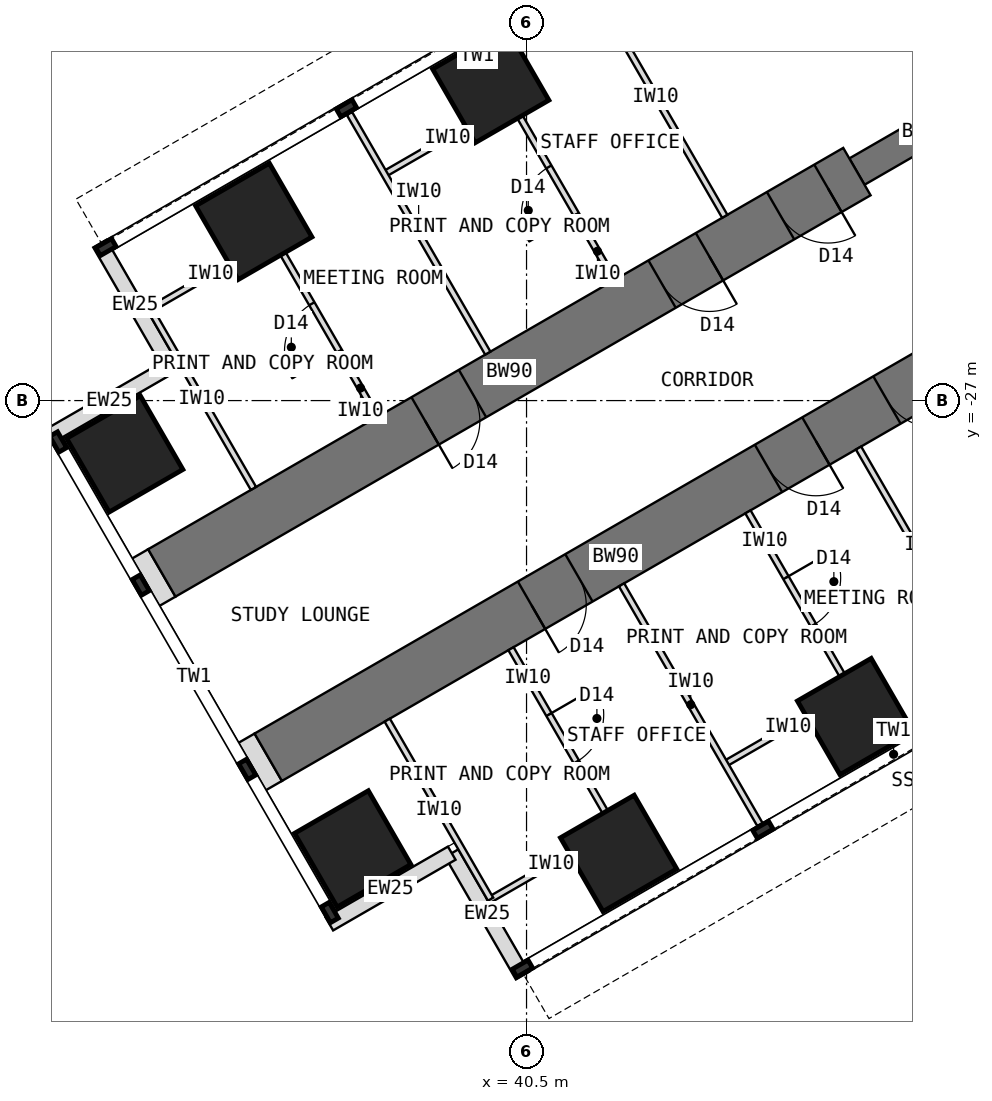
"""IFC4 building model, lengths in metres.
Left out: names, types, materials, properties, quantities, classifications, styles, units other than length and angle.
Written with IfcOpenShell. Run it as: python <this file> out.ifc"""

import sys

from ifc_helpers import new_model, si_unit, direction, frame, frame_2d, origin, origin_2d, place, context, subcontext, project, spatial, rectangle, extrude, element, fill, save


model = new_model("IFC4")
c1 = context("Model", 3, precision=1e-05, world=origin(), true_north=direction((0.0, 1.0)))
c2 = subcontext(c1, "Body", "Model", "MODEL_VIEW")
j1 = project(units=[si_unit("LENGTHUNIT", "METRE"), si_unit("PLANEANGLEUNIT", "RADIAN")], contexts=[c1])
p1 = place(None, origin())
s1 = spatial("IfcSite", under=j1, at=p1, CompositionType="ELEMENT")
p2 = place(p1, origin())
s2 = spatial("IfcBuilding", under=s1, at=p2, CompositionType="ELEMENT")
p3 = place(p2, frame((0.0, 0.0, 84.5)))
s3 = spatial("IfcBuildingStorey", under=s2, at=p3, CompositionType="ELEMENT", Elevation=84.5)
p4 = place(p3, frame((45.904, -18.0, 0.0), z_axis=(0.0, 0.0, 1.0), x_axis=(0.500024481964, -0.866011268655, 0.0)))
e1 = element("IfcWall", 1, at=p4, inside=s3, PredefinedType="SHEAR", context=c2, shape_type="SweptSolid", body=[
    extrude(rectangle(XDim=4.548, YDim=0.7, at=frame_2d((2.274, 0.0))), origin(), (0.0, 0.0, 1.0), 4.0),
])
p5 = place(p3, frame((47.684, -26.266, 0.0), z_axis=(0.0, 0.0, 1.0), x_axis=(-0.866027579429, -0.499996231654, 0.0)))
e2 = element("IfcWall", 2, at=p5, inside=s3, PredefinedType="SHEAR", context=c2, shape_type="SweptSolid", body=[
    extrude(rectangle(XDim=13.2, YDim=0.9, at=frame_2d((6.6, 0.0))), origin(), (0.0, 0.0, 1.0), 4.0),
])
p6 = place(p5, frame((0.55, 0.0, 0.0)))
e3 = element("IfcOpeningElement", 3, at=p6, cuts=e2, PredefinedType="OPENING", context=c2, shape_type="SweptSolid", body=[
    extrude(rectangle(XDim=0.9, YDim=2.1, at=frame_2d((0.45, 1.05))), frame((0.0, 0.46, 0.0), z_axis=(0.0, -1.0, 0.0), x_axis=(1.0, 0.0, 0.0)), (0.0, 0.0, 1.0), 0.92),
])
p7 = place(p5, frame((2.8, 0.0, 0.0)))
e4 = element("IfcOpeningElement", 4, at=p7, cuts=e2, PredefinedType="OPENING", context=c2, shape_type="SweptSolid", body=[
    extrude(rectangle(XDim=0.9, YDim=2.1, at=frame_2d((0.45, 1.05))), frame((0.0, 0.46, 0.0), z_axis=(0.0, -1.0, 0.0), x_axis=(1.0, 0.0, 0.0)), (0.0, 0.0, 1.0), 0.92),
])
p8 = place(p5, frame((7.3, 0.0, 0.0)))
e5 = element("IfcOpeningElement", 5, at=p8, cuts=e2, PredefinedType="OPENING", context=c2, shape_type="SweptSolid", body=[
    extrude(rectangle(XDim=0.9, YDim=2.1, at=frame_2d((0.45, 1.05))), frame((0.0, 0.46, 0.0), z_axis=(0.0, -1.0, 0.0), x_axis=(1.0, 0.0, 0.0)), (0.0, 0.0, 1.0), 0.92),
])
p9 = place(p3, frame((48.178, -21.939, 0.0), z_axis=(0.0, 0.0, 1.0), x_axis=(-0.866072649678, -0.499918158782, 0.0)))
e6 = element("IfcWall", 6, at=p9, inside=s3, PredefinedType="SHEAR", context=c2, shape_type="SweptSolid", body=[
    extrude(rectangle(XDim=2.592, YDim=0.5, at=frame_2d((1.296, 0.0))), origin(), (0.0, 0.0, 1.0), 4.0),
])
p10 = place(p3, frame((45.934, -23.234, 0.0), z_axis=(0.0, 0.0, 1.0), x_axis=(-0.866019570528, -0.500010103361, 0.0)))
e7 = element("IfcWall", 7, at=p10, inside=s3, PredefinedType="SHEAR", context=c2, shape_type="SweptSolid", body=[
    extrude(rectangle(XDim=13.2, YDim=0.9, at=frame_2d((6.6, 0.0))), origin(), (0.0, 0.0, 1.0), 4.0),
])
p11 = place(p10, frame((0.55, 0.0, 0.0)))
e8 = element("IfcOpeningElement", 8, at=p11, cuts=e7, PredefinedType="OPENING", context=c2, shape_type="SweptSolid", body=[
    extrude(rectangle(XDim=0.9, YDim=2.1, at=frame_2d((0.45, 1.05))), frame((0.0, 0.46, 0.0), z_axis=(0.0, -1.0, 0.0), x_axis=(1.0, 0.0, 0.0)), (0.0, 0.0, 1.0), 0.92),
])
p12 = place(p10, frame((2.8, 0.0, 0.0)))
e9 = element("IfcOpeningElement", 9, at=p12, cuts=e7, PredefinedType="OPENING", context=c2, shape_type="SweptSolid", body=[
    extrude(rectangle(XDim=0.9, YDim=2.1, at=frame_2d((0.45, 1.05))), frame((0.0, 0.46, 0.0), z_axis=(0.0, -1.0, 0.0), x_axis=(1.0, 0.0, 0.0)), (0.0, 0.0, 1.0), 0.92),
])
p13 = place(p10, frame((7.3, 0.0, 0.0)))
e10 = element("IfcOpeningElement", 10, at=p13, cuts=e7, PredefinedType="OPENING", context=c2, shape_type="SweptSolid", body=[
    extrude(rectangle(XDim=0.9, YDim=2.1, at=frame_2d((0.45, 1.05))), frame((0.0, 0.46, 0.0), z_axis=(0.0, -1.0, 0.0), x_axis=(1.0, 0.0, 0.0)), (0.0, 0.0, 1.0), 0.92),
])
for number, where, z_axis, x_axis in (
    (11, (45.912, -32.196, 0.0), (0.0, 0.0, 1.0), (0.866, 0.5, 0.0)),
    (12, (39.912, -21.804, 0.0), (0.0, 0.0, 1.0), (0.866, 0.5, 0.0)),
    (13, (42.014, -34.446, 0.0), (0.0, 0.0, 1.0), (0.866, 0.5, 0.0)),
    (14, (36.014, -24.054, 0.0), (0.0, 0.0, 1.0), (0.866, 0.5, 0.0)),
    (15, (37.642, -34.373, 0.0), (0.0, 0.0, 1.0), (0.866, 0.5, 0.0)),
    (16, (33.892, -27.877, 0.0), (0.0, 0.0, 1.0), (0.866, 0.5, 0.0)),
):
    element("IfcColumn", number, at=place(p3, frame(where, z_axis=z_axis, x_axis=x_axis)), inside=s3, PredefinedType="COLUMN", context=c2, shape_type="SweptSolid", body=[
        extrude(rectangle(XDim=1.4, YDim=1.4, at=origin_2d()), origin(), (0.0, 0.0, 1.0), 4.0),
    ])
for number, where, z_axis, x_axis in (
    (17, (40.433, -36.456, 0.0), (0.0, 0.0, 1.0), (-0.5, 0.866, 0.0)),
    (18, (39.27, -34.443, 0.0), (0.0, 0.0, 1.0), (-0.866, -0.5, 0.0)),
    (19, (33.483, -24.419, 0.0), (0.0, 0.0, 1.0), (0.5, -0.866, 0.0)),
    (20, (34.645, -26.432, 0.0), (0.0, 0.0, 1.0), (-0.866, -0.5, 0.0)),
):
    element("IfcWall", number, at=place(p3, frame(where, z_axis=z_axis, x_axis=x_axis)), inside=s3, PredefinedType="STANDARD", context=c2, shape_type="SweptSolid", body=[
        extrude(rectangle(XDim=2.325, YDim=0.25, at=frame_2d((1.163, 0.0))), origin(), (0.0, 0.0, 1.0), 3.8),
    ])
for number, where, z_axis, x_axis in (
    (21, (36.252, -32.865, 0.0), (0.0, 0.0, 1.0), (-0.866, -0.5, 0.0)),
    (22, (34.502, -29.834, 0.0), (0.0, 0.0, 1.0), (-0.866, -0.5, 0.0)),
):
    element("IfcWall", number, at=place(p3, frame(where, z_axis=z_axis, x_axis=x_axis)), inside=s3, PredefinedType="PARTITIONING", context=c2, shape_type="SweptSolid", body=[
        extrude(rectangle(XDim=0.31, YDim=0.9, at=frame_2d((0.155, 0.0))), origin(), (0.0, 0.0, 1.0), 3.8),
    ])
for number, where, z_axis, x_axis in (
    (23, (45.96, -27.78, 0.0), (0.0, 0.0, 1.0), (0.5, -0.866, 0.0)),
    (24, (42.063, -30.03, 0.0), (0.0, 0.0, 1.0), (0.5, -0.866, 0.0)),
):
    element("IfcWall", number, at=place(p3, frame(where, z_axis=z_axis, x_axis=x_axis)), inside=s3, PredefinedType="PARTITIONING", context=c2, shape_type="SweptSolid", body=[
        extrude(rectangle(XDim=4.55, YDim=0.1, at=frame_2d((2.275, 0.0))), origin(), (0.0, 0.0, 1.0), 3.8),
    ])
p14 = place(p3, frame((45.842, -31.775, 0.0), z_axis=(0.0, 0.0, 1.0), x_axis=(-0.866006032174, -0.500033551112, 0.0)))
e25 = element("IfcWall", 25, at=p14, inside=s3, PredefinedType="PARTITIONING", context=c2, shape_type="SweptSolid", body=[
    extrude(rectangle(XDim=2.4, YDim=0.1, at=frame_2d((1.2, 0.0))), origin(), (0.0, 0.0, 1.0), 3.8),
])
p15 = place(p3, frame((44.141, -28.83, 0.0), z_axis=(0.0, 0.0, 1.0), x_axis=(0.500062241894, -0.865989465428, 0.0)))
e26 = element("IfcWall", 26, at=p15, inside=s3, PredefinedType="PARTITIONING", context=c2, shape_type="SweptSolid", body=[
    extrude(rectangle(XDim=3.4, YDim=0.1, at=frame_2d((1.7, 0.0))), origin(), (0.0, 0.0, 1.0), 3.8),
])
p16 = place(p15, frame((1.25, 0.0, 0.0)))
e27 = element("IfcOpeningElement", 27, at=p16, cuts=e26, PredefinedType="OPENING", context=c2, shape_type="SweptSolid", body=[
    extrude(rectangle(XDim=0.9, YDim=2.1, at=frame_2d((0.45, 1.05))), frame((0.0, 0.06, 0.0), z_axis=(0.0, -1.0, 0.0), x_axis=(1.0, 0.0, 0.0)), (0.0, 0.0, 1.0), 0.12),
])
p17 = place(p3, frame((41.944, -34.025, 0.0), z_axis=(0.0, 0.0, 1.0), x_axis=(-0.865980596518, -0.500077600433, 0.0)))
e28 = element("IfcWall", 28, at=p17, inside=s3, PredefinedType="PARTITIONING", context=c2, shape_type="SweptSolid", body=[
    extrude(rectangle(XDim=2.4, YDim=0.1, at=frame_2d((1.2, 0.0))), origin(), (0.0, 0.0, 1.0), 3.8),
])
p18 = place(p3, frame((40.244, -31.08, 0.0), z_axis=(0.0, 0.0, 1.0), x_axis=(0.500008388397, -0.866020560687, 0.0)))
e29 = element("IfcWall", 29, at=p18, inside=s3, PredefinedType="PARTITIONING", context=c2, shape_type="SweptSolid", body=[
    extrude(rectangle(XDim=3.4, YDim=0.1, at=frame_2d((1.7, 0.0))), origin(), (0.0, 0.0, 1.0), 3.8),
])
p19 = place(p18, frame((1.25, 0.0, 0.0)))
e30 = element("IfcOpeningElement", 30, at=p19, cuts=e29, PredefinedType="OPENING", context=c2, shape_type="SweptSolid", body=[
    extrude(rectangle(XDim=0.9, YDim=2.1, at=frame_2d((0.45, 1.05))), frame((0.0, 0.06, 0.0), z_axis=(0.0, -1.0, 0.0), x_axis=(1.0, 0.0, 0.0)), (0.0, 0.0, 1.0), 0.12),
])
p20 = place(p3, frame((38.209, -32.255, 0.0), z_axis=(0.0, 0.0, 1.0), x_axis=(0.500008388397, -0.866020560687, 0.0)))
e31 = element("IfcWall", 31, at=p20, inside=s3, PredefinedType="PARTITIONING", context=c2, shape_type="SweptSolid", body=[
    extrude(rectangle(XDim=3.4, YDim=0.1, at=frame_2d((1.7, 0.0))), origin(), (0.0, 0.0, 1.0), 3.8),
])
for number, where, z_axis, x_axis in (
    (32, (43.76, -23.97, 0.0), (0.0, 0.0, 1.0), (-0.5, 0.866, 0.0)),
    (33, (39.863, -26.22, 0.0), (0.0, 0.0, 1.0), (-0.5, 0.866, 0.0)),
):
    element("IfcWall", number, at=place(p3, frame(where, z_axis=z_axis, x_axis=x_axis)), inside=s3, PredefinedType="PARTITIONING", context=c2, shape_type="SweptSolid", body=[
        extrude(rectangle(XDim=4.55, YDim=0.1, at=frame_2d((2.275, 0.0))), origin(), (0.0, 0.0, 1.0), 3.8),
    ])
p21 = place(p3, frame((40.241, -22.075, 0.0), z_axis=(0.0, 0.0, 1.0), x_axis=(-0.866024647952, -0.500001309137, 0.0)))
e34 = element("IfcWall", 34, at=p21, inside=s3, PredefinedType="PARTITIONING", context=c2, shape_type="SweptSolid", body=[
    extrude(rectangle(XDim=2.4, YDim=0.1, at=frame_2d((1.2, 0.0))), origin(), (0.0, 0.0, 1.0), 3.8),
])
p22 = place(p3, frame((41.941, -25.02, 0.0), z_axis=(0.0, 0.0, 1.0), x_axis=(-0.499977295307, 0.866038511948, 0.0)))
e35 = element("IfcWall", 35, at=p22, inside=s3, PredefinedType="PARTITIONING", context=c2, shape_type="SweptSolid", body=[
    extrude(rectangle(XDim=3.4, YDim=0.1, at=frame_2d((1.7, 0.0))), origin(), (0.0, 0.0, 1.0), 3.8),
])
p23 = place(p22, frame((1.25, 0.0, 0.0)))
e36 = element("IfcOpeningElement", 36, at=p23, cuts=e35, PredefinedType="OPENING", context=c2, shape_type="SweptSolid", body=[
    extrude(rectangle(XDim=0.9, YDim=2.1, at=frame_2d((0.45, 1.05))), frame((0.0, 0.06, 0.0), z_axis=(0.0, -1.0, 0.0), x_axis=(1.0, 0.0, 0.0)), (0.0, 0.0, 1.0), 0.12),
])
p24 = place(p3, frame((36.344, -24.325, 0.0), z_axis=(0.0, 0.0, 1.0), x_axis=(-0.866024647952, -0.500001309137, 0.0)))
e37 = element("IfcWall", 37, at=p24, inside=s3, PredefinedType="PARTITIONING", context=c2, shape_type="SweptSolid", body=[
    extrude(rectangle(XDim=2.4, YDim=0.1, at=frame_2d((1.2, 0.0))), origin(), (0.0, 0.0, 1.0), 3.8),
])
p25 = place(p3, frame((38.044, -27.27, 0.0), z_axis=(0.0, 0.0, 1.0), x_axis=(-0.500031147688, 0.866007419912, 0.0)))
e38 = element("IfcWall", 38, at=p25, inside=s3, PredefinedType="PARTITIONING", context=c2, shape_type="SweptSolid", body=[
    extrude(rectangle(XDim=3.4, YDim=0.1, at=frame_2d((1.7, 0.0))), origin(), (0.0, 0.0, 1.0), 3.8),
])
p26 = place(p25, frame((1.25, 0.0, 0.0)))
e39 = element("IfcOpeningElement", 39, at=p26, cuts=e38, PredefinedType="OPENING", context=c2, shape_type="SweptSolid", body=[
    extrude(rectangle(XDim=0.9, YDim=2.1, at=frame_2d((0.45, 1.05))), frame((0.0, 0.06, 0.0), z_axis=(0.0, -1.0, 0.0), x_axis=(1.0, 0.0, 0.0)), (0.0, 0.0, 1.0), 0.12),
])
p27 = place(p3, frame((36.009, -28.445, 0.0), z_axis=(0.0, 0.0, 1.0), x_axis=(-0.500031147688, 0.866007419912, 0.0)))
e40 = element("IfcWall", 40, at=p27, inside=s3, PredefinedType="PARTITIONING", context=c2, shape_type="SweptSolid", body=[
    extrude(rectangle(XDim=3.4, YDim=0.1, at=frame_2d((1.7, 0.0))), origin(), (0.0, 0.0, 1.0), 3.8),
])
p28 = place(p16, origin())
e41 = element("IfcDoor", 41, at=p28, inside=s3, OperationType="SINGLE_SWING_LEFT", PredefinedType="DOOR", context=c2, shape_type="SweptSolid", body=[
    extrude(rectangle(XDim=0.9, YDim=2.1, at=frame_2d((0.45, 1.05))), frame((0.0, 0.025, 0.0), z_axis=(0.0, -1.0, 0.0), x_axis=(1.0, 0.0, 0.0)), (0.0, 0.0, 1.0), 0.05),
])
fill(e27, e41)
p29 = place(p19, origin())
e42 = element("IfcDoor", 42, at=p29, inside=s3, OperationType="SINGLE_SWING_LEFT", PredefinedType="DOOR", context=c2, shape_type="SweptSolid", body=[
    extrude(rectangle(XDim=0.9, YDim=2.1, at=frame_2d((0.45, 1.05))), frame((0.0, 0.025, 0.0), z_axis=(0.0, -1.0, 0.0), x_axis=(1.0, 0.0, 0.0)), (0.0, 0.0, 1.0), 0.05),
])
fill(e30, e42)
p30 = place(p23, origin())
e43 = element("IfcDoor", 43, at=p30, inside=s3, OperationType="SINGLE_SWING_LEFT", PredefinedType="DOOR", context=c2, shape_type="SweptSolid", body=[
    extrude(rectangle(XDim=0.9, YDim=2.1, at=frame_2d((0.45, 1.05))), frame((0.0, 0.025, 0.0), z_axis=(0.0, -1.0, 0.0), x_axis=(1.0, 0.0, 0.0)), (0.0, 0.0, 1.0), 0.05),
])
fill(e36, e43)
p31 = place(p26, origin())
e44 = element("IfcDoor", 44, at=p31, inside=s3, OperationType="SINGLE_SWING_LEFT", PredefinedType="DOOR", context=c2, shape_type="SweptSolid", body=[
    extrude(rectangle(XDim=0.9, YDim=2.1, at=frame_2d((0.45, 1.05))), frame((0.0, 0.025, 0.0), z_axis=(0.0, -1.0, 0.0), x_axis=(1.0, 0.0, 0.0)), (0.0, 0.0, 1.0), 0.05),
])
fill(e39, e44)
p32 = place(p6, origin())
e45 = element("IfcDoor", 45, at=p32, inside=s3, OperationType="SINGLE_SWING_LEFT", PredefinedType="DOOR", context=c2, shape_type="SweptSolid", body=[
    extrude(rectangle(XDim=0.82, YDim=2.06, at=frame_2d((0.45, 1.03))), frame((0.0, 0.025, 0.0), z_axis=(0.0, -1.0, 0.0), x_axis=(1.0, 0.0, 0.0)), (0.0, 0.0, 1.0), 0.05),
    extrude(rectangle(XDim=0.04, YDim=2.1, at=frame_2d((0.02, 1.05))), frame((0.0, 0.45, 0.0), z_axis=(0.0, -1.0, 0.0), x_axis=(1.0, 0.0, 0.0)), (0.0, 0.0, 1.0), 0.899),
    extrude(rectangle(XDim=0.04, YDim=2.1, at=frame_2d((0.88, 1.05))), frame((0.0, 0.45, 0.0), z_axis=(0.0, -1.0, 0.0), x_axis=(1.0, 0.0, 0.0)), (0.0, 0.0, 1.0), 0.899),
    extrude(rectangle(XDim=0.82, YDim=0.04, at=frame_2d((0.45, 2.08))), frame((0.0, 0.45, 0.0), z_axis=(0.0, -1.0, 0.0), x_axis=(1.0, 0.0, 0.0)), (0.0, 0.0, 1.0), 0.899),
])
fill(e3, e45)
p33 = place(p7, origin())
e46 = element("IfcDoor", 46, at=p33, inside=s3, OperationType="SINGLE_SWING_LEFT", PredefinedType="DOOR", context=c2, shape_type="SweptSolid", body=[
    extrude(rectangle(XDim=0.82, YDim=2.06, at=frame_2d((0.45, 1.03))), frame((0.0, 0.025, 0.0), z_axis=(0.0, -1.0, 0.0), x_axis=(1.0, 0.0, 0.0)), (0.0, 0.0, 1.0), 0.05),
    extrude(rectangle(XDim=0.04, YDim=2.1, at=frame_2d((0.02, 1.05))), frame((0.0, 0.45, 0.0), z_axis=(0.0, -1.0, 0.0), x_axis=(1.0, 0.0, 0.0)), (0.0, 0.0, 1.0), 0.899),
    extrude(rectangle(XDim=0.04, YDim=2.1, at=frame_2d((0.88, 1.05))), frame((0.0, 0.45, 0.0), z_axis=(0.0, -1.0, 0.0), x_axis=(1.0, 0.0, 0.0)), (0.0, 0.0, 1.0), 0.899),
    extrude(rectangle(XDim=0.82, YDim=0.04, at=frame_2d((0.45, 2.08))), frame((0.0, 0.45, 0.0), z_axis=(0.0, -1.0, 0.0), x_axis=(1.0, 0.0, 0.0)), (0.0, 0.0, 1.0), 0.899),
])
fill(e4, e46)
p34 = place(p8, origin())
e47 = element("IfcDoor", 47, at=p34, inside=s3, OperationType="SINGLE_SWING_RIGHT", PredefinedType="DOOR", context=c2, shape_type="SweptSolid", body=[
    extrude(rectangle(XDim=0.82, YDim=2.06, at=frame_2d((0.45, 1.03))), frame((0.0, 0.025, 0.0), z_axis=(0.0, -1.0, 0.0), x_axis=(1.0, 0.0, 0.0)), (0.0, 0.0, 1.0), 0.05),
    extrude(rectangle(XDim=0.04, YDim=2.1, at=frame_2d((0.02, 1.05))), frame((0.0, 0.45, 0.0), z_axis=(0.0, -1.0, 0.0), x_axis=(1.0, 0.0, 0.0)), (0.0, 0.0, 1.0), 0.899),
    extrude(rectangle(XDim=0.04, YDim=2.1, at=frame_2d((0.88, 1.05))), frame((0.0, 0.45, 0.0), z_axis=(0.0, -1.0, 0.0), x_axis=(1.0, 0.0, 0.0)), (0.0, 0.0, 1.0), 0.899),
    extrude(rectangle(XDim=0.82, YDim=0.04, at=frame_2d((0.45, 2.08))), frame((0.0, 0.45, 0.0), z_axis=(0.0, -1.0, 0.0), x_axis=(1.0, 0.0, 0.0)), (0.0, 0.0, 1.0), 0.899),
])
fill(e5, e47)
p35 = place(p11, origin())
e48 = element("IfcDoor", 48, at=p35, inside=s3, OperationType="SINGLE_SWING_LEFT", PredefinedType="DOOR", context=c2, shape_type="SweptSolid", body=[
    extrude(rectangle(XDim=0.82, YDim=2.06, at=frame_2d((0.45, 1.03))), frame((0.0, 0.025, 0.0), z_axis=(0.0, -1.0, 0.0), x_axis=(1.0, 0.0, 0.0)), (0.0, 0.0, 1.0), 0.05),
    extrude(rectangle(XDim=0.04, YDim=2.1, at=frame_2d((0.02, 1.05))), frame((0.0, 0.45, 0.0), z_axis=(0.0, -1.0, 0.0), x_axis=(1.0, 0.0, 0.0)), (0.0, 0.0, 1.0), 0.899),
    extrude(rectangle(XDim=0.04, YDim=2.1, at=frame_2d((0.88, 1.05))), frame((0.0, 0.45, 0.0), z_axis=(0.0, -1.0, 0.0), x_axis=(1.0, 0.0, 0.0)), (0.0, 0.0, 1.0), 0.899),
    extrude(rectangle(XDim=0.82, YDim=0.04, at=frame_2d((0.45, 2.08))), frame((0.0, 0.45, 0.0), z_axis=(0.0, -1.0, 0.0), x_axis=(1.0, 0.0, 0.0)), (0.0, 0.0, 1.0), 0.899),
])
fill(e8, e48)
p36 = place(p12, origin())
e49 = element("IfcDoor", 49, at=p36, inside=s3, OperationType="SINGLE_SWING_LEFT", PredefinedType="DOOR", context=c2, shape_type="SweptSolid", body=[
    extrude(rectangle(XDim=0.82, YDim=2.06, at=frame_2d((0.45, 1.03))), frame((0.0, 0.025, 0.0), z_axis=(0.0, -1.0, 0.0), x_axis=(1.0, 0.0, 0.0)), (0.0, 0.0, 1.0), 0.05),
    extrude(rectangle(XDim=0.04, YDim=2.1, at=frame_2d((0.02, 1.05))), frame((0.0, 0.45, 0.0), z_axis=(0.0, -1.0, 0.0), x_axis=(1.0, 0.0, 0.0)), (0.0, 0.0, 1.0), 0.899),
    extrude(rectangle(XDim=0.04, YDim=2.1, at=frame_2d((0.88, 1.05))), frame((0.0, 0.45, 0.0), z_axis=(0.0, -1.0, 0.0), x_axis=(1.0, 0.0, 0.0)), (0.0, 0.0, 1.0), 0.899),
    extrude(rectangle(XDim=0.82, YDim=0.04, at=frame_2d((0.45, 2.08))), frame((0.0, 0.45, 0.0), z_axis=(0.0, -1.0, 0.0), x_axis=(1.0, 0.0, 0.0)), (0.0, 0.0, 1.0), 0.899),
])
fill(e9, e49)
p37 = place(p13, origin())
e50 = element("IfcDoor", 50, at=p37, inside=s3, OperationType="SINGLE_SWING_RIGHT", PredefinedType="DOOR", context=c2, shape_type="SweptSolid", body=[
    extrude(rectangle(XDim=0.82, YDim=2.06, at=frame_2d((0.45, 1.03))), frame((0.0, 0.025, 0.0), z_axis=(0.0, -1.0, 0.0), x_axis=(1.0, 0.0, 0.0)), (0.0, 0.0, 1.0), 0.05),
    extrude(rectangle(XDim=0.04, YDim=2.1, at=frame_2d((0.02, 1.05))), frame((0.0, 0.45, 0.0), z_axis=(0.0, -1.0, 0.0), x_axis=(1.0, 0.0, 0.0)), (0.0, 0.0, 1.0), 0.899),
    extrude(rectangle(XDim=0.04, YDim=2.1, at=frame_2d((0.88, 1.05))), frame((0.0, 0.45, 0.0), z_axis=(0.0, -1.0, 0.0), x_axis=(1.0, 0.0, 0.0)), (0.0, 0.0, 1.0), 0.899),
    extrude(rectangle(XDim=0.82, YDim=0.04, at=frame_2d((0.45, 2.08))), frame((0.0, 0.45, 0.0), z_axis=(0.0, -1.0, 0.0), x_axis=(1.0, 0.0, 0.0)), (0.0, 0.0, 1.0), 0.899),
])
fill(e10, e50)
save(model, sys.argv[1])
